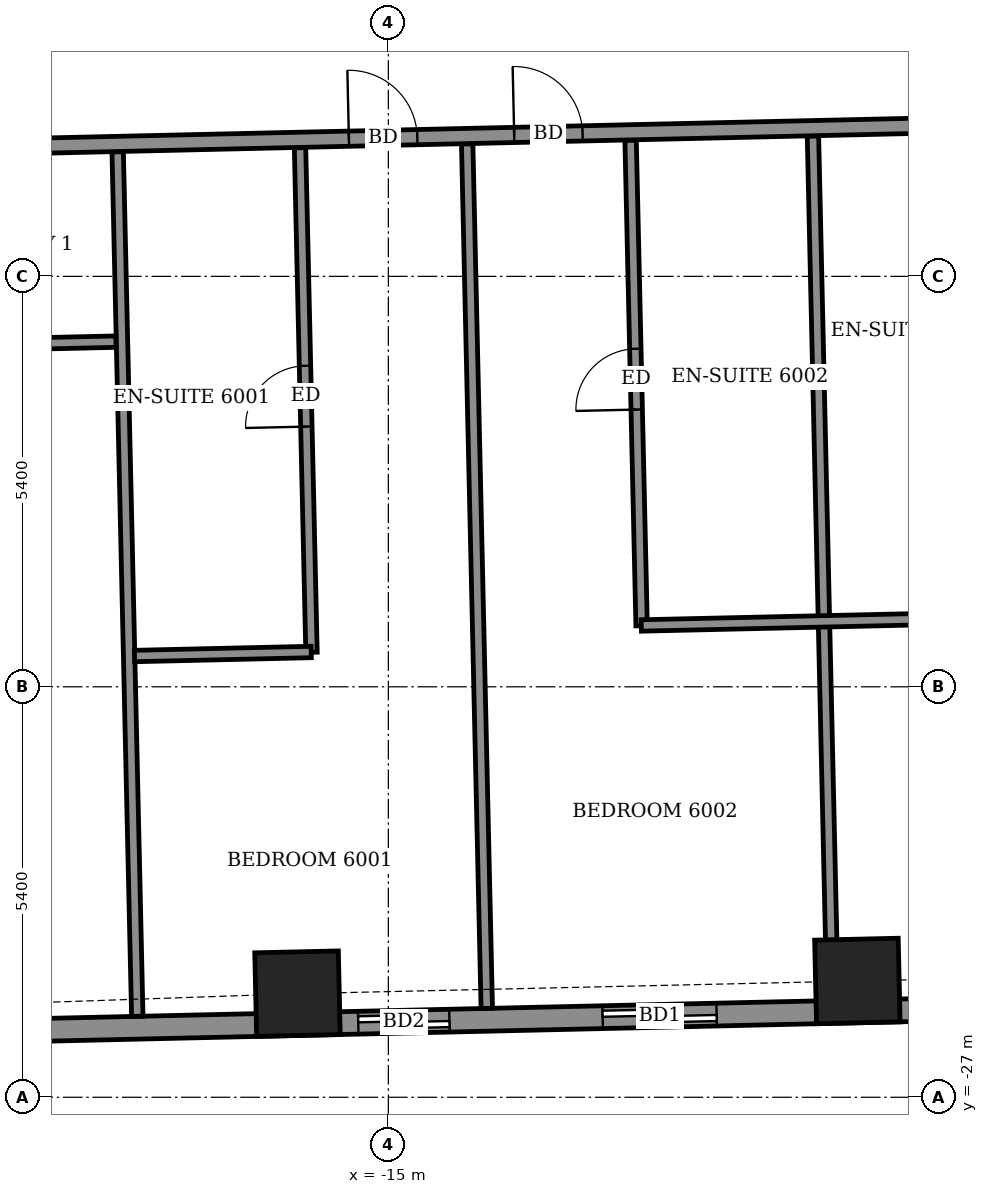
"""IFC4 building model, lengths in metres.
Left out: names, types, materials, properties, quantities, classifications, styles, units other than length and angle.
Written with IfcOpenShell. Run it as: python <this file> out.ifc"""

import sys

from ifc_helpers import new_model, si_unit, direction, frame, frame_2d, origin, origin_2d, place, context, subcontext, project, spatial, rectangle, extrude, element, fill, save


model = new_model("IFC4")
c1 = context("Model", 3, precision=1e-05, world=origin(), true_north=direction((0.0, 1.0)))
c2 = subcontext(c1, "Body", "Model", "MODEL_VIEW")
j1 = project(units=[si_unit("LENGTHUNIT", "METRE"), si_unit("PLANEANGLEUNIT", "RADIAN")], contexts=[c1])
p1 = place(None, origin())
s1 = spatial("IfcSite", under=j1, at=p1, CompositionType="ELEMENT")
p2 = place(p1, origin())
s2 = spatial("IfcBuilding", under=s1, at=p2, CompositionType="ELEMENT")
p3 = place(p2, frame((0.0, 0.0, 238.3)))
s3 = spatial("IfcBuildingStorey", under=s2, at=p3, CompositionType="ELEMENT", Elevation=238.3)
for number, where, z_axis, x_axis in (
    (1, (-16.196, -25.637, -0.55), (0.0, 0.0, 1.0), (1.0, 0.023, 0.0)),
    (2, (-8.829, -25.47, -0.55), (0.0, 0.0, 1.0), (1.0, 0.023, 0.0)),
):
    element("IfcColumn", number, at=place(p3, frame(where, z_axis=z_axis, x_axis=x_axis)), inside=s3, PredefinedType="COLUMN", context=c2, shape_type="SweptSolid", body=[
        extrude(rectangle(XDim=1.1, YDim=1.1, at=origin_2d()), origin(), (0.0, 0.0, 1.0), 3.6),
    ])
p4 = place(p3, frame((-23.403, -26.201, 0.0), z_axis=(0.0, 0.0, 1.0), x_axis=(0.999742770494, 0.022680230258, 0.0)))
e3 = element("IfcWall", 3, at=p4, inside=s3, PredefinedType="SOLIDWALL", context=c2, shape_type="SweptSolid", body=[
    extrude(rectangle(XDim=43.908, YDim=0.3, at=frame_2d((21.954, 0.0))), origin(), (0.0, 0.0, 1.0), 2.55),
])
p5 = place(p4, frame((2.124, 0.0, 0.0)))
e4 = element("IfcOpeningElement", 4, at=p5, cuts=e3, PredefinedType="OPENING", context=c2, shape_type="SweptSolid", body=[
    extrude(rectangle(XDim=1.5, YDim=2.4, at=frame_2d((0.75, 1.2))), frame((0.0, 0.16, 0.0), z_axis=(0.0, -1.0, 0.0), x_axis=(1.0, 0.0, 0.0)), (0.0, 0.0, 1.0), 0.32),
])
p6 = place(p4, frame((8.009, 0.0, 0.0)))
e5 = element("IfcOpeningElement", 5, at=p6, cuts=e3, PredefinedType="OPENING", context=c2, shape_type="SweptSolid", body=[
    extrude(rectangle(XDim=1.2, YDim=2.4, at=frame_2d((0.6, 1.2))), frame((0.0, 0.16, 0.0), z_axis=(0.0, -1.0, 0.0), x_axis=(1.0, 0.0, 0.0)), (0.0, 0.0, 1.0), 0.32),
])
p7 = place(p4, frame((11.225, 0.0, 0.0)))
e6 = element("IfcOpeningElement", 6, at=p7, cuts=e3, PredefinedType="OPENING", context=c2, shape_type="SweptSolid", body=[
    extrude(rectangle(XDim=1.5, YDim=2.4, at=frame_2d((0.75, 1.2))), frame((0.0, 0.16, 0.0), z_axis=(0.0, -1.0, 0.0), x_axis=(1.0, 0.0, 0.0)), (0.0, 0.0, 1.0), 0.32),
])
p8 = place(p4, frame((16.093, 0.0, 0.0)))
e7 = element("IfcOpeningElement", 7, at=p8, cuts=e3, PredefinedType="OPENING", context=c2, shape_type="SweptSolid", body=[
    extrude(rectangle(XDim=1.5, YDim=2.4, at=frame_2d((0.75, 1.2))), frame((0.0, 0.16, 0.0), z_axis=(0.0, -1.0, 0.0), x_axis=(1.0, 0.0, 0.0)), (0.0, 0.0, 1.0), 0.32),
])
p9 = place(p4, frame((19.477, 0.0, 0.0)))
e8 = element("IfcOpeningElement", 8, at=p9, cuts=e3, PredefinedType="OPENING", context=c2, shape_type="SweptSolid", body=[
    extrude(rectangle(XDim=1.5, YDim=2.4, at=frame_2d((0.75, 1.2))), frame((0.0, 0.16, 0.0), z_axis=(0.0, -1.0, 0.0), x_axis=(1.0, 0.0, 0.0)), (0.0, 0.0, 1.0), 0.32),
])
p10 = place(p4, frame((24.8, 0.0, 0.0)))
e9 = element("IfcOpeningElement", 9, at=p10, cuts=e3, PredefinedType="OPENING", context=c2, shape_type="SweptSolid", body=[
    extrude(rectangle(XDim=1.5, YDim=2.4, at=frame_2d((0.75, 1.2))), frame((0.0, 0.16, 0.0), z_axis=(0.0, -1.0, 0.0), x_axis=(1.0, 0.0, 0.0)), (0.0, 0.0, 1.0), 0.32),
])
p11 = place(p4, frame((30.111, 0.0, 0.0)))
e10 = element("IfcOpeningElement", 10, at=p11, cuts=e3, PredefinedType="OPENING", context=c2, shape_type="SweptSolid", body=[
    extrude(rectangle(XDim=1.5, YDim=2.4, at=frame_2d((0.75, 1.2))), frame((0.0, 0.16, 0.0), z_axis=(0.0, -1.0, 0.0), x_axis=(1.0, 0.0, 0.0)), (0.0, 0.0, 1.0), 0.32),
])
p12 = place(p4, frame((33.495, 0.0, 0.0)))
e11 = element("IfcOpeningElement", 11, at=p12, cuts=e3, PredefinedType="OPENING", context=c2, shape_type="SweptSolid", body=[
    extrude(rectangle(XDim=1.5, YDim=2.4, at=frame_2d((0.75, 1.2))), frame((0.0, 0.16, 0.0), z_axis=(0.0, -1.0, 0.0), x_axis=(1.0, 0.0, 0.0)), (0.0, 0.0, 1.0), 0.32),
])
p13 = place(p4, frame((38.245, 0.0, 0.0)))
e12 = element("IfcOpeningElement", 12, at=p13, cuts=e3, PredefinedType="OPENING", context=c2, shape_type="SweptSolid", body=[
    extrude(rectangle(XDim=1.5, YDim=2.4, at=frame_2d((0.75, 1.2))), frame((0.0, 0.16, 0.0), z_axis=(0.0, -1.0, 0.0), x_axis=(1.0, 0.0, 0.0)), (0.0, 0.0, 1.0), 0.32),
])
p14 = place(p4, frame((41.482, 0.0, 0.9)))
e13 = element("IfcOpeningElement", 13, at=p14, cuts=e3, PredefinedType="OPENING", context=c2, shape_type="SweptSolid", body=[
    extrude(rectangle(XDim=1.2, YDim=1.5, at=frame_2d((0.6, 0.75))), frame((0.0, 0.16, 0.0), z_axis=(0.0, -1.0, 0.0), x_axis=(1.0, 0.0, 0.0)), (0.0, 0.0, 1.0), 0.32),
])
p15 = place(p3, frame((-18.303, -25.935, 0.0), z_axis=(0.0, 0.0, 1.0), x_axis=(-0.022684355347, 0.999742676904, 0.0)))
e14 = element("IfcWall", 14, at=p15, inside=s3, PredefinedType="PARTITIONING", context=c2, shape_type="SweptSolid", body=[
    extrude(rectangle(XDim=11.376, YDim=0.15, at=frame_2d((5.688, 0.0))), origin(), (0.0, 0.0, 1.0), 2.55),
])
p16 = place(p3, frame((-13.705, -25.831, 0.0), z_axis=(0.0, 0.0, 1.0), x_axis=(-0.022662905301, 0.999743163379, 0.0)))
e15 = element("IfcWall", 15, at=p16, inside=s3, PredefinedType="PARTITIONING", context=c2, shape_type="SweptSolid", body=[
    extrude(rectangle(XDim=11.376, YDim=0.15, at=frame_2d((5.688, 0.0))), origin(), (0.0, 0.0, 1.0), 2.5),
])
p17 = place(p3, frame((-9.156, -25.728, 0.0), z_axis=(0.0, 0.0, 1.0), x_axis=(-0.022684355347, 0.999742676904, 0.0)))
e16 = element("IfcWall", 16, at=p17, inside=s3, PredefinedType="PARTITIONING", context=c2, shape_type="SweptSolid", body=[
    extrude(rectangle(XDim=11.376, YDim=0.15, at=frame_2d((5.688, 0.0))), origin(), (0.0, 0.0, 1.0), 3.05),
])
p18 = place(p3, frame((-16.011, -21.146, 0.0), z_axis=(0.0, 0.0, 1.0), x_axis=(-0.022760662159, 0.999740942574, 0.0)))
e17 = element("IfcWall", 17, at=p18, inside=s3, PredefinedType="PARTITIONING", context=c2, shape_type="SweptSolid", body=[
    extrude(rectangle(XDim=6.64, YDim=0.15, at=frame_2d((3.32, 0.0))), origin(), (0.0, 0.0, 1.0), 3.05),
])
p19 = place(p18, frame((2.97, 0.0, 0.0)))
e18 = element("IfcOpeningElement", 18, at=p19, cuts=e17, PredefinedType="OPENING", context=c2, shape_type="SweptSolid", body=[
    extrude(rectangle(XDim=0.8, YDim=2.1, at=frame_2d((0.4, 1.05))), frame((0.0, 0.085, 0.0), z_axis=(0.0, -1.0, 0.0), x_axis=(1.0, 0.0, 0.0)), (0.0, 0.0, 1.0), 0.17),
])
p20 = place(p3, frame((-18.34, -21.195, 0.0), z_axis=(0.0, 0.0, 1.0), x_axis=(0.99974053329, 0.022778632478, 0.0)))
e19 = element("IfcWall", 19, at=p20, inside=s3, PredefinedType="PARTITIONING", context=c2, shape_type="SweptSolid", body=[
    extrude(rectangle(XDim=2.326, YDim=0.15, at=frame_2d((1.163, 0.0))), origin(), (0.0, 0.0, 1.0), 3.05),
])
p21 = place(p3, frame((-11.668, -20.797, 0.0), z_axis=(0.0, 0.0, 1.0), x_axis=(-0.022695368097, 0.999742426962, 0.0)))
e20 = element("IfcWall", 20, at=p21, inside=s3, PredefinedType="PARTITIONING", context=c2, shape_type="SweptSolid", body=[
    extrude(rectangle(XDim=6.39, YDim=0.15, at=frame_2d((3.195, 0.0))), origin(), (0.0, 0.0, 1.0), 3.05),
])
p22 = place(p21, frame((2.845, 0.0, 0.0)))
e21 = element("IfcOpeningElement", 21, at=p22, cuts=e20, PredefinedType="OPENING", context=c2, shape_type="SweptSolid", body=[
    extrude(rectangle(XDim=0.8, YDim=2.1, at=frame_2d((0.4, 1.05))), frame((0.0, 0.085, 0.0), z_axis=(0.0, -1.0, 0.0), x_axis=(1.0, 0.0, 0.0)), (0.0, 0.0, 1.0), 0.17),
])
p23 = place(p3, frame((-11.672, -20.793, 0.0), z_axis=(0.0, 0.0, 1.0), x_axis=(0.999747191239, 0.022484519337, 0.0)))
e22 = element("IfcWall", 22, at=p23, inside=s3, PredefinedType="PARTITIONING", context=c2, shape_type="SweptSolid", body=[
    extrude(rectangle(XDim=4.799, YDim=0.15, at=frame_2d((2.4, 0.0))), origin(), (0.0, 0.0, 1.0), 3.05),
])
p24 = place(p3, frame((-21.308, -17.121, 0.0), z_axis=(0.0, 0.0, 1.0), x_axis=(0.999741002259, 0.022758040381, 0.0)))
e23 = element("IfcWall", 23, at=p24, inside=s3, PredefinedType="PARTITIONING", context=c2, shape_type="SweptSolid", body=[
    extrude(rectangle(XDim=2.725, YDim=0.15, at=frame_2d((1.362, 0.0))), origin(), (0.0, 0.0, 1.0), 3.05),
])
p25 = place(p3, frame((-27.016, -14.65, 0.0), z_axis=(0.0, 0.0, 1.0), x_axis=(0.999742623033, 0.022686729391, 0.0)))
e24 = element("IfcWall", 24, at=p25, inside=s3, PredefinedType="PARTITIONING", context=c2, shape_type="SweptSolid", body=[
    extrude(rectangle(XDim=50.858, YDim=0.2, at=frame_2d((25.429, 0.0))), origin(), (0.0, 0.0, 1.0), 3.05),
])
p26 = place(p25, frame((1.625, 0.0, 0.0)))
e25 = element("IfcOpeningElement", 25, at=p26, cuts=e24, PredefinedType="OPENING", context=c2, shape_type="SweptSolid", body=[
    extrude(rectangle(XDim=1.0, YDim=2.1, at=frame_2d((0.5, 1.05))), frame((0.0, 0.11, 0.0), z_axis=(0.0, -1.0, 0.0), x_axis=(1.0, 0.0, 0.0)), (0.0, 0.0, 1.0), 0.22),
])
p27 = place(p25, frame((6.6, 0.0, 0.0)))
e26 = element("IfcOpeningElement", 26, at=p27, cuts=e24, PredefinedType="OPENING", context=c2, shape_type="SweptSolid", body=[
    extrude(rectangle(XDim=0.9, YDim=2.1, at=frame_2d((0.45, 1.05))), frame((0.0, 0.11, 0.0), z_axis=(0.0, -1.0, 0.0), x_axis=(1.0, 0.0, 0.0)), (0.0, 0.0, 1.0), 0.22),
])
p28 = place(p25, frame((11.5, 0.0, 0.0)))
e27 = element("IfcOpeningElement", 27, at=p28, cuts=e24, PredefinedType="OPENING", context=c2, shape_type="SweptSolid", body=[
    extrude(rectangle(XDim=0.9, YDim=2.1, at=frame_2d((0.45, 1.05))), frame((0.0, 0.11, 0.0), z_axis=(0.0, -1.0, 0.0), x_axis=(1.0, 0.0, 0.0)), (0.0, 0.0, 1.0), 0.22),
])
p29 = place(p25, frame((13.675, 0.0, 0.0)))
e28 = element("IfcOpeningElement", 28, at=p29, cuts=e24, PredefinedType="OPENING", context=c2, shape_type="SweptSolid", body=[
    extrude(rectangle(XDim=0.9, YDim=2.1, at=frame_2d((0.45, 1.05))), frame((0.0, 0.11, 0.0), z_axis=(0.0, -1.0, 0.0), x_axis=(1.0, 0.0, 0.0)), (0.0, 0.0, 1.0), 0.22),
])
p30 = place(p25, frame((20.625, 0.0, 0.0)))
e29 = element("IfcOpeningElement", 29, at=p30, cuts=e24, PredefinedType="OPENING", context=c2, shape_type="SweptSolid", body=[
    extrude(rectangle(XDim=0.9, YDim=2.1, at=frame_2d((0.45, 1.05))), frame((0.0, 0.11, 0.0), z_axis=(0.0, -1.0, 0.0), x_axis=(1.0, 0.0, 0.0)), (0.0, 0.0, 1.0), 0.22),
])
p31 = place(p25, frame((22.775, 0.0, 0.0)))
e30 = element("IfcOpeningElement", 30, at=p31, cuts=e24, PredefinedType="OPENING", context=c2, shape_type="SweptSolid", body=[
    extrude(rectangle(XDim=0.9, YDim=2.1, at=frame_2d((0.45, 1.05))), frame((0.0, 0.11, 0.0), z_axis=(0.0, -1.0, 0.0), x_axis=(1.0, 0.0, 0.0)), (0.0, 0.0, 1.0), 0.22),
])
p32 = place(p25, frame((29.65, 0.0, 0.0)))
e31 = element("IfcOpeningElement", 31, at=p32, cuts=e24, PredefinedType="OPENING", context=c2, shape_type="SweptSolid", body=[
    extrude(rectangle(XDim=0.9, YDim=2.1, at=frame_2d((0.45, 1.05))), frame((0.0, 0.11, 0.0), z_axis=(0.0, -1.0, 0.0), x_axis=(1.0, 0.0, 0.0)), (0.0, 0.0, 1.0), 0.22),
])
p33 = place(p25, frame((31.625, 0.0, 0.0)))
e32 = element("IfcOpeningElement", 32, at=p33, cuts=e24, PredefinedType="OPENING", context=c2, shape_type="SweptSolid", body=[
    extrude(rectangle(XDim=0.9, YDim=2.1, at=frame_2d((0.45, 1.05))), frame((0.0, 0.11, 0.0), z_axis=(0.0, -1.0, 0.0), x_axis=(1.0, 0.0, 0.0)), (0.0, 0.0, 1.0), 0.22),
])
p34 = place(p25, frame((38.5, 0.0, 0.0)))
e33 = element("IfcOpeningElement", 33, at=p34, cuts=e24, PredefinedType="OPENING", context=c2, shape_type="SweptSolid", body=[
    extrude(rectangle(XDim=0.9, YDim=2.1, at=frame_2d((0.45, 1.05))), frame((0.0, 0.11, 0.0), z_axis=(0.0, -1.0, 0.0), x_axis=(1.0, 0.0, 0.0)), (0.0, 0.0, 1.0), 0.22),
])
p35 = place(p25, frame((40.55, 0.0, 0.0)))
e34 = element("IfcOpeningElement", 34, at=p35, cuts=e24, PredefinedType="OPENING", context=c2, shape_type="SweptSolid", body=[
    extrude(rectangle(XDim=0.9, YDim=2.1, at=frame_2d((0.45, 1.05))), frame((0.0, 0.11, 0.0), z_axis=(0.0, -1.0, 0.0), x_axis=(1.0, 0.0, 0.0)), (0.0, 0.0, 1.0), 0.22),
])
p36 = place(p25, frame((47.601, 0.0, 0.0)))
e35 = element("IfcOpeningElement", 35, at=p36, cuts=e24, PredefinedType="OPENING", context=c2, shape_type="SweptSolid", body=[
    extrude(rectangle(XDim=1.0, YDim=2.1, at=frame_2d((0.5, 1.05))), frame((0.0, 0.11, 0.0), z_axis=(0.0, -1.0, 0.0), x_axis=(1.0, 0.0, 0.0)), (0.0, 0.0, 1.0), 0.22),
])
p37 = place(p6, origin())
e36 = element("IfcDoor", 36, at=p37, inside=s3, OperationType="SLIDING_TO_LEFT", PredefinedType="DOOR", context=c2, shape_type="SweptSolid", body=[
    extrude(rectangle(XDim=1.2, YDim=2.4, at=frame_2d((0.6, 1.2))), frame((0.0, 0.025, 0.0), z_axis=(0.0, -1.0, 0.0), x_axis=(1.0, 0.0, 0.0)), (0.0, 0.0, 1.0), 0.05),
])
fill(e5, e36)
p38 = place(p7, origin())
e37 = element("IfcDoor", 37, at=p38, inside=s3, OperationType="SLIDING_TO_LEFT", PredefinedType="DOOR", context=c2, shape_type="SweptSolid", body=[
    extrude(rectangle(XDim=1.5, YDim=2.4, at=frame_2d((0.75, 1.2))), frame((0.0, 0.025, 0.0), z_axis=(0.0, -1.0, 0.0), x_axis=(1.0, 0.0, 0.0)), (0.0, 0.0, 1.0), 0.05),
])
fill(e6, e37)
p39 = place(p28, origin())
e38 = element("IfcDoor", 38, at=p39, inside=s3, OperationType="SINGLE_SWING_LEFT", PredefinedType="DOOR", context=c2, shape_type="SweptSolid", body=[
    extrude(rectangle(XDim=0.9, YDim=2.1, at=frame_2d((0.45, 1.05))), frame((0.0, 0.025, 0.0), z_axis=(0.0, -1.0, 0.0), x_axis=(1.0, 0.0, 0.0)), (0.0, 0.0, 1.0), 0.05),
])
fill(e27, e38)
p40 = place(p19, origin())
e39 = element("IfcDoor", 39, at=p40, inside=s3, OperationType="SINGLE_SWING_LEFT", PredefinedType="DOOR", context=c2, shape_type="SweptSolid", body=[
    extrude(rectangle(XDim=0.8, YDim=2.1, at=frame_2d((0.4, 1.05))), frame((0.0, 0.025, 0.0), z_axis=(0.0, -1.0, 0.0), x_axis=(1.0, 0.0, 0.0)), (0.0, 0.0, 1.0), 0.05),
])
fill(e18, e39)
p41 = place(p29, origin())
e40 = element("IfcDoor", 40, at=p41, inside=s3, OperationType="SINGLE_SWING_RIGHT", PredefinedType="DOOR", context=c2, shape_type="SweptSolid", body=[
    extrude(rectangle(XDim=0.9, YDim=2.1, at=frame_2d((0.45, 1.05))), frame((0.0, 0.025, 0.0), z_axis=(0.0, -1.0, 0.0), x_axis=(1.0, 0.0, 0.0)), (0.0, 0.0, 1.0), 0.05),
])
fill(e28, e40)
p42 = place(p22, origin())
e41 = element("IfcDoor", 41, at=p42, inside=s3, OperationType="SINGLE_SWING_RIGHT", PredefinedType="DOOR", context=c2, shape_type="SweptSolid", body=[
    extrude(rectangle(XDim=0.8, YDim=2.1, at=frame_2d((0.4, 1.05))), frame((0.0, 0.025, 0.0), z_axis=(0.0, -1.0, 0.0), x_axis=(1.0, 0.0, 0.0)), (0.0, 0.0, 1.0), 0.05),
])
fill(e21, e41)
save(model, sys.argv[1])
